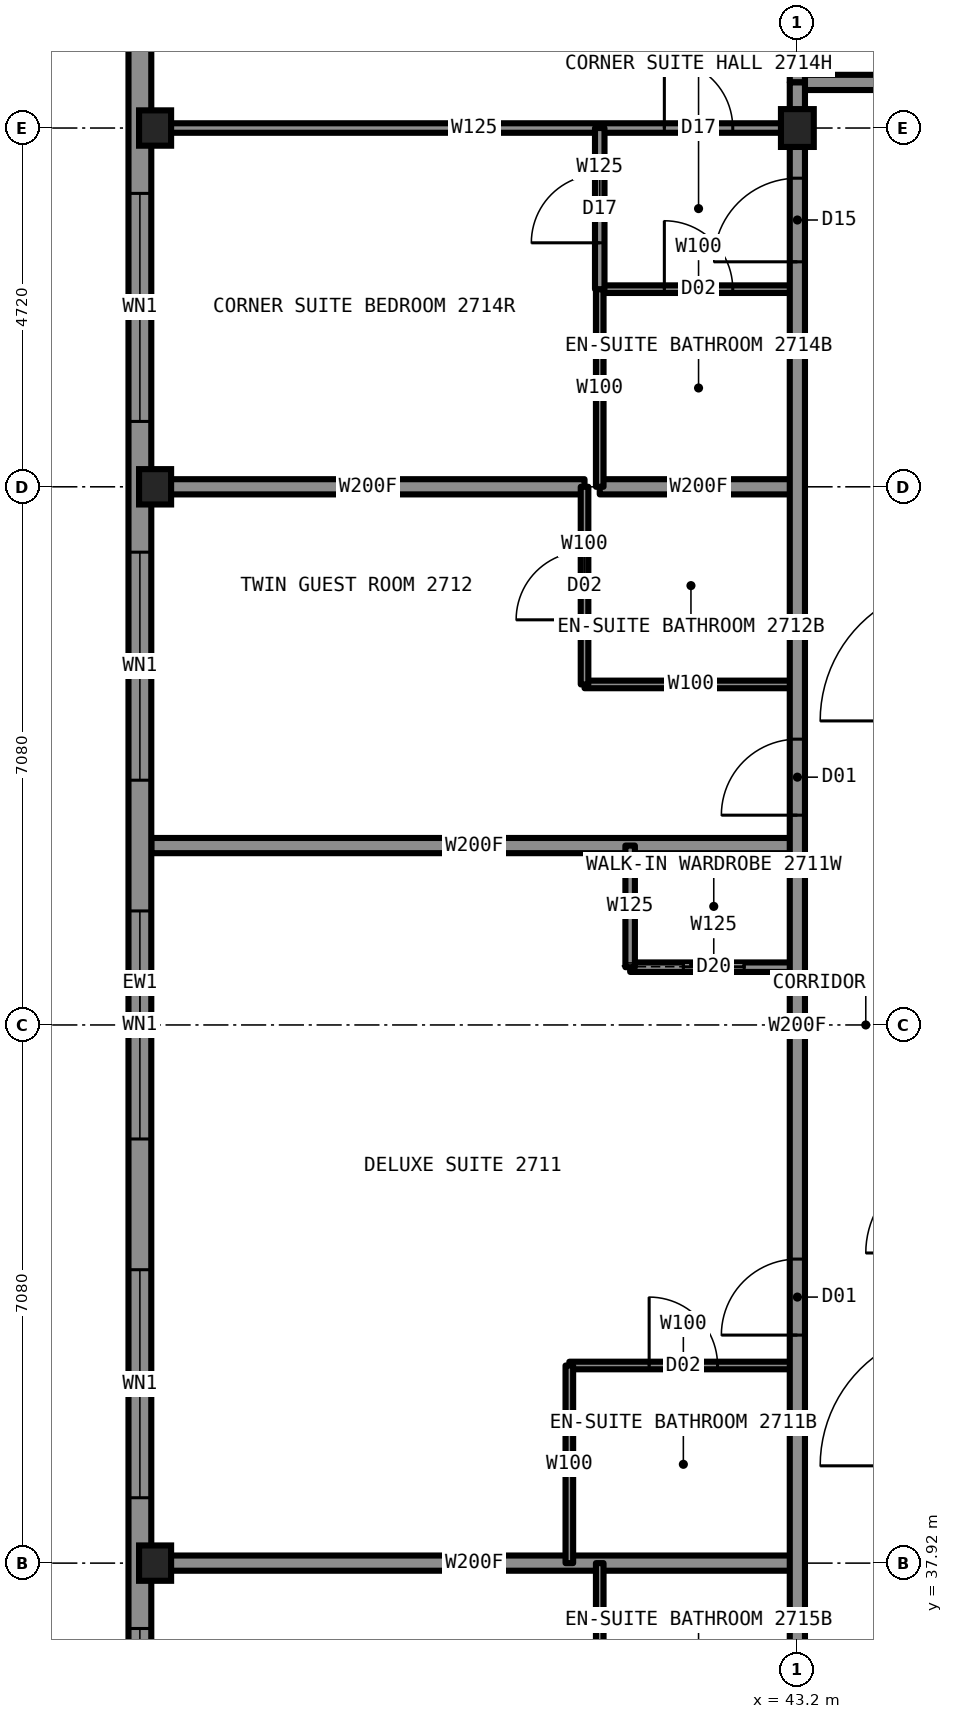
"""IFC4 building model, lengths in metres.
Left out: names, types, materials, properties, quantities, classifications, styles, units other than length and angle.
Written with IfcOpenShell. Run it as: python <this file> out.ifc"""

import sys

from ifc_helpers import new_model, si_unit, direction, frame, frame_2d, origin, origin_2d, place, context, subcontext, project, spatial, rectangle, i_section, extrude, element, fill, save


model = new_model("IFC4")
c1 = context("Model", 3, precision=1e-05, world=origin(), true_north=direction((0.0, 1.0)))
c2 = subcontext(c1, "Body", "Model", "MODEL_VIEW")
j1 = project(units=[si_unit("LENGTHUNIT", "METRE"), si_unit("PLANEANGLEUNIT", "RADIAN")], contexts=[c1])
p1 = place(None, origin())
s1 = spatial("IfcSite", under=j1, at=p1, CompositionType="ELEMENT")
p2 = place(p1, origin())
s2 = spatial("IfcBuilding", under=s1, at=p2, CompositionType="ELEMENT")
p3 = place(p2, frame((0.0, 0.0, 103.9)))
s3 = spatial("IfcBuildingStorey", under=s2, at=p3, CompositionType="ELEMENT", Elevation=103.9)
for number, where, z_axis, x_axis in (
    (1, (34.75, 37.92, 0.0), (0.0, 0.0, 1.0), (1.0, 0.0, 0.0)),
    (2, (34.75, 52.08, 0.0), (0.0, 0.0, 1.0), (1.0, 0.0, 0.0)),
    (3, (34.75, 56.8, 0.0), (0.0, 0.0, 1.0), (1.0, 0.0, 0.0)),
):
    element("IfcColumn", number, at=place(p3, frame(where, z_axis=z_axis, x_axis=x_axis)), inside=s3, PredefinedType="COLUMN", context=c2, shape_type="SweptSolid", body=[
        extrude(i_section(OverallWidth=0.422, OverallDepth=0.465, WebThickness=0.045, FlangeThickness=0.073, at=origin_2d()), origin(), (0.0, 0.0, 1.0), 3.5),
    ])
p4 = place(p3, frame((43.2, 56.8, 0.0), z_axis=(0.0, 0.0, 1.0), x_axis=(1.0, 0.0, 0.0)))
e4 = element("IfcColumn", 4, at=p4, inside=s3, PredefinedType="COLUMN", context=c2, shape_type="SweptSolid", body=[
    extrude(i_section(OverallWidth=0.432, OverallDepth=0.498, WebThickness=0.056, FlangeThickness=0.089, at=origin_2d()), origin(), (0.0, 0.0, 1.0), 3.5),
])
p5 = place(p3, frame((40.2, 40.52, 0.0), z_axis=(0.0, 0.0, 1.0), x_axis=(1.0, 0.0, 0.0)))
e5 = element("IfcWall", 5, at=p5, inside=s3, PredefinedType="PARTITIONING", context=c2, shape_type="SweptSolid", body=[
    extrude(rectangle(XDim=3.0, YDim=0.1, at=frame_2d((1.5, 0.0))), origin(), (0.0, 0.0, 1.0), 3.33),
])
p6 = place(p5, frame((1.05, 0.0, 0.0)))
e6 = element("IfcOpeningElement", 6, at=p6, cuts=e5, PredefinedType="OPENING", context=c2, shape_type="SweptSolid", body=[
    extrude(rectangle(XDim=0.9, YDim=2.1, at=frame_2d((0.45, 1.05))), frame((0.0, 0.06, 0.0), z_axis=(0.0, -1.0, 0.0), x_axis=(1.0, 0.0, 0.0)), (0.0, 0.0, 1.0), 0.12),
])
p7 = place(p3, frame((34.7, 37.92, 0.0), z_axis=(0.0, 0.0, 1.0), x_axis=(1.0, 0.0, 0.0)))
e7 = element("IfcWall", 7, at=p7, inside=s3, PredefinedType="PARTITIONING", context=c2, shape_type="SweptSolid", body=[
    extrude(rectangle(XDim=8.5, YDim=0.2, at=frame_2d((4.25, 0.0))), origin(), (0.0, 0.0, 1.0), 2.573),
])
p8 = place(p3, frame((41.0, 45.76, 0.0), z_axis=(0.0, 0.0, 1.0), x_axis=(1.0, 0.0, 0.0)))
e8 = element("IfcWall", 8, at=p8, inside=s3, PredefinedType="PARTITIONING", context=c2, shape_type="SweptSolid", body=[
    extrude(rectangle(XDim=2.2, YDim=0.125, at=frame_2d((1.1, 0.0))), origin(), (0.0, 0.0, 1.0), 3.33),
])
p9 = place(p8, frame((0.7, 0.0, 0.0)))
e9 = element("IfcOpeningElement", 9, at=p9, cuts=e8, PredefinedType="OPENING", context=c2, shape_type="SweptSolid", body=[
    extrude(rectangle(XDim=0.8, YDim=2.1, at=frame_2d((0.4, 1.05))), frame((0.0, 0.073, 0.0), z_axis=(0.0, -1.0, 0.0), x_axis=(1.0, 0.0, 0.0)), (0.0, 0.0, 1.0), 0.145),
])
p10 = place(p3, frame((34.7, 56.8, 0.0), z_axis=(0.0, 0.0, 1.0), x_axis=(1.0, 0.0, 0.0)))
e10 = element("IfcWall", 10, at=p10, inside=s3, PredefinedType="PARTITIONING", context=c2, shape_type="SweptSolid", body=[
    extrude(rectangle(XDim=8.5, YDim=0.125, at=frame_2d((4.25, 0.0))), origin(), (0.0, 0.0, 1.0), 2.573),
])
p11 = place(p10, frame((6.75, 0.0, 0.0)))
e11 = element("IfcOpeningElement", 11, at=p11, cuts=e10, PredefinedType="OPENING", context=c2, shape_type="SweptSolid", body=[
    extrude(rectangle(XDim=0.9, YDim=2.2, at=frame_2d((0.45, 1.1))), frame((0.0, 0.073, 0.0), z_axis=(0.0, -1.0, 0.0), x_axis=(1.0, 0.0, 0.0)), (0.0, 0.0, 1.0), 0.145),
])
p12 = place(p3, frame((43.2, 57.4, 0.0), z_axis=(0.0, 0.0, 1.0), x_axis=(1.0, 0.0, 0.0)))
e12 = element("IfcWall", 12, at=p12, inside=s3, PredefinedType="PARTITIONING", context=c2, shape_type="SweptSolid", body=[
    extrude(rectangle(XDim=23.6, YDim=0.2, at=frame_2d((11.8, 0.0))), origin(), (0.0, 0.0, 1.0), 3.33),
])
p13 = place(p12, frame((2.55, 0.0, 0.0)))
e13 = element("IfcOpeningElement", 13, at=p13, cuts=e12, PredefinedType="OPENING", context=c2, shape_type="SweptSolid", body=[
    extrude(rectangle(XDim=1.0, YDim=2.2, at=frame_2d((0.5, 1.1))), frame((0.0, 0.11, 0.0), z_axis=(0.0, -1.0, 0.0), x_axis=(1.0, 0.0, 0.0)), (0.0, 0.0, 1.0), 0.22),
])
p14 = place(p12, frame((7.72, 0.0, 0.0)))
e14 = element("IfcOpeningElement", 14, at=p14, cuts=e12, PredefinedType="OPENING", context=c2, shape_type="SweptSolid", body=[
    extrude(rectangle(XDim=1.0, YDim=2.2, at=frame_2d((0.5, 1.1))), frame((0.0, 0.11, 0.0), z_axis=(0.0, -1.0, 0.0), x_axis=(1.0, 0.0, 0.0)), (0.0, 0.0, 1.0), 0.22),
])
p15 = place(p12, frame((14.56, 0.0, 0.0)))
e15 = element("IfcOpeningElement", 15, at=p15, cuts=e12, PredefinedType="OPENING", context=c2, shape_type="SweptSolid", body=[
    extrude(rectangle(XDim=1.0, YDim=2.2, at=frame_2d((0.5, 1.1))), frame((0.0, 0.11, 0.0), z_axis=(0.0, -1.0, 0.0), x_axis=(1.0, 0.0, 0.0)), (0.0, 0.0, 1.0), 0.22),
])
p16 = place(p12, frame((20.34, 0.0, 0.0)))
e16 = element("IfcOpeningElement", 16, at=p16, cuts=e12, PredefinedType="OPENING", context=c2, shape_type="SweptSolid", body=[
    extrude(rectangle(XDim=1.0, YDim=2.2, at=frame_2d((0.5, 1.1))), frame((0.0, 0.11, 0.0), z_axis=(0.0, -1.0, 0.0), x_axis=(1.0, 0.0, 0.0)), (0.0, 0.0, 1.0), 0.22),
])
p17 = place(p3, frame((34.7, 47.36, 0.0), z_axis=(0.0, 0.0, 1.0), x_axis=(1.0, 0.0, 0.0)))
e17 = element("IfcWall", 17, at=p17, inside=s3, PredefinedType="PARTITIONING", context=c2, shape_type="SweptSolid", body=[
    extrude(rectangle(XDim=8.5, YDim=0.2, at=frame_2d((4.25, 0.0))), origin(), (0.0, 0.0, 1.0), 2.731),
])
p18 = place(p3, frame((40.4, 49.48, 0.0), z_axis=(0.0, 0.0, 1.0), x_axis=(1.0, 0.0, 0.0)))
e18 = element("IfcWall", 18, at=p18, inside=s3, PredefinedType="PARTITIONING", context=c2, shape_type="SweptSolid", body=[
    extrude(rectangle(XDim=2.8, YDim=0.1, at=frame_2d((1.4, 0.0))), origin(), (0.0, 0.0, 1.0), 3.33),
])
p19 = place(p3, frame((34.7, 52.08, 0.0), z_axis=(0.0, 0.0, 1.0), x_axis=(1.0, 0.0, 0.0)))
e19 = element("IfcWall", 19, at=p19, inside=s3, PredefinedType="PARTITIONING", context=c2, shape_type="SweptSolid", body=[
    extrude(rectangle(XDim=5.7, YDim=0.2, at=frame_2d((2.85, 0.0))), origin(), (0.0, 0.0, 1.0), 2.573),
])
p20 = place(p3, frame((40.6, 52.08, 0.0), z_axis=(0.0, 0.0, 1.0), x_axis=(1.0, 0.0, 0.0)))
e20 = element("IfcWall", 20, at=p20, inside=s3, PredefinedType="PARTITIONING", context=c2, shape_type="SweptSolid", body=[
    extrude(rectangle(XDim=2.6, YDim=0.2, at=frame_2d((1.3, 0.0))), origin(), (0.0, 0.0, 1.0), 2.573),
])
p21 = place(p3, frame((40.6, 54.68, 0.0), z_axis=(0.0, 0.0, 1.0), x_axis=(1.0, 0.0, 0.0)))
e21 = element("IfcWall", 21, at=p21, inside=s3, PredefinedType="PARTITIONING", context=c2, shape_type="SweptSolid", body=[
    extrude(rectangle(XDim=2.6, YDim=0.1, at=frame_2d((1.3, 0.0))), origin(), (0.0, 0.0, 1.0), 3.33),
])
p22 = place(p21, frame((0.85, 0.0, 0.0)))
e22 = element("IfcOpeningElement", 22, at=p22, cuts=e21, PredefinedType="OPENING", context=c2, shape_type="SweptSolid", body=[
    extrude(rectangle(XDim=0.9, YDim=2.1, at=frame_2d((0.45, 1.05))), frame((0.0, 0.06, 0.0), z_axis=(0.0, -1.0, 0.0), x_axis=(1.0, 0.0, 0.0)), (0.0, 0.0, 1.0), 0.12),
])
p23 = place(p3, frame((43.2, 33.2, 0.0), z_axis=(0.0, 0.0, 1.0), x_axis=(0.0, 1.0, 0.0)))
e23 = element("IfcWall", 23, at=p23, inside=s3, PredefinedType="PARTITIONING", context=c2, shape_type="SweptSolid", body=[
    extrude(rectangle(XDim=23.58, YDim=0.2, at=frame_2d((11.79, 0.0))), origin(), (0.0, 0.0, 1.0), 3.33),
])
p24 = place(p23, frame((7.72, 0.0, 0.0)))
e24 = element("IfcOpeningElement", 24, at=p24, cuts=e23, PredefinedType="OPENING", context=c2, shape_type="SweptSolid", body=[
    extrude(rectangle(XDim=1.0, YDim=2.2, at=frame_2d((0.5, 1.1))), frame((0.0, 0.11, 0.0), z_axis=(0.0, -1.0, 0.0), x_axis=(1.0, 0.0, 0.0)), (0.0, 0.0, 1.0), 0.22),
])
p25 = place(p23, frame((14.56, 0.0, 0.0)))
e25 = element("IfcOpeningElement", 25, at=p25, cuts=e23, PredefinedType="OPENING", context=c2, shape_type="SweptSolid", body=[
    extrude(rectangle(XDim=1.0, YDim=2.2, at=frame_2d((0.5, 1.1))), frame((0.0, 0.11, 0.0), z_axis=(0.0, -1.0, 0.0), x_axis=(1.0, 0.0, 0.0)), (0.0, 0.0, 1.0), 0.22),
])
p26 = place(p23, frame((21.84, 0.0, 0.0)))
e26 = element("IfcOpeningElement", 26, at=p26, cuts=e23, PredefinedType="OPENING", context=c2, shape_type="SweptSolid", body=[
    extrude(rectangle(XDim=1.1, YDim=2.2, at=frame_2d((0.55, 1.1))), frame((0.0, 0.11, 0.0), z_axis=(0.0, -1.0, 0.0), x_axis=(1.0, 0.0, 0.0)), (0.0, 0.0, 1.0), 0.22),
])
p27 = place(p23, frame((0.66, 0.0, 0.0)))
e27 = element("IfcOpeningElement", 27, at=p27, cuts=e23, PredefinedType="OPENING", context=c2, shape_type="SweptSolid", body=[
    extrude(rectangle(XDim=1.1, YDim=2.2, at=frame_2d((0.55, 1.1))), frame((0.0, 0.11, 0.0), z_axis=(0.0, -1.0, 0.0), x_axis=(1.0, 0.0, 0.0)), (0.0, 0.0, 1.0), 0.22),
])
p28 = place(p3, frame((43.2, 57.4, 0.0), z_axis=(0.0, 0.0, 1.0), x_axis=(0.0, 1.0, 0.0)))
e28 = element("IfcWall", 28, at=p28, inside=s3, PredefinedType="PARTITIONING", context=c2, shape_type="SweptSolid", body=[
    extrude(rectangle(XDim=7.9, YDim=0.2, at=frame_2d((3.95, 0.0))), origin(), (0.0, 0.0, 1.0), 2.573),
])
p29 = place(p3, frame((41.0, 45.76, 0.0), z_axis=(0.0, 0.0, 1.0), x_axis=(0.0, 1.0, 0.0)))
e29 = element("IfcWall", 29, at=p29, inside=s3, PredefinedType="PARTITIONING", context=c2, shape_type="SweptSolid", body=[
    extrude(rectangle(XDim=1.6, YDim=0.125, at=frame_2d((0.8, 0.0))), origin(), (0.0, 0.0, 1.0), 3.33),
])
for number, where, z_axis, x_axis in (
    (30, (40.6, 35.32, 0.0), (0.0, 0.0, 1.0), (0.0, 1.0, 0.0)),
    (31, (40.6, 52.08, 0.0), (0.0, 0.0, 1.0), (0.0, 1.0, 0.0)),
):
    element("IfcWall", number, at=place(p3, frame(where, z_axis=z_axis, x_axis=x_axis)), inside=s3, PredefinedType="PARTITIONING", context=c2, shape_type="SweptSolid", body=[
        extrude(rectangle(XDim=2.6, YDim=0.1, at=frame_2d((1.3, 0.0))), origin(), (0.0, 0.0, 1.0), 3.33),
    ])
p30 = place(p3, frame((40.6, 54.68, 0.0), z_axis=(0.0, 0.0, 1.0), x_axis=(0.0, 1.0, 0.0)))
e32 = element("IfcWall", 32, at=p30, inside=s3, PredefinedType="PARTITIONING", context=c2, shape_type="SweptSolid", body=[
    extrude(rectangle(XDim=2.12, YDim=0.125, at=frame_2d((1.06, 0.0))), origin(), (0.0, 0.0, 1.0), 3.33),
])
p31 = place(p30, frame((0.61, 0.0, 0.0)))
e33 = element("IfcOpeningElement", 33, at=p31, cuts=e32, PredefinedType="OPENING", context=c2, shape_type="SweptSolid", body=[
    extrude(rectangle(XDim=0.9, YDim=2.2, at=frame_2d((0.45, 1.1))), frame((0.0, 0.073, 0.0), z_axis=(0.0, -1.0, 0.0), x_axis=(1.0, 0.0, 0.0)), (0.0, 0.0, 1.0), 0.145),
])
p32 = place(p3, frame((40.4, 49.48, 0.0), z_axis=(0.0, 0.0, 1.0), x_axis=(0.0, 1.0, 0.0)))
e34 = element("IfcWall", 34, at=p32, inside=s3, PredefinedType="PARTITIONING", context=c2, shape_type="SweptSolid", body=[
    extrude(rectangle(XDim=2.6, YDim=0.1, at=frame_2d((1.3, 0.0))), origin(), (0.0, 0.0, 1.0), 3.33),
])
p33 = place(p32, frame((0.85, 0.0, 0.0)))
e35 = element("IfcOpeningElement", 35, at=p33, cuts=e34, PredefinedType="OPENING", context=c2, shape_type="SweptSolid", body=[
    extrude(rectangle(XDim=0.9, YDim=2.1, at=frame_2d((0.45, 1.05))), frame((0.0, 0.06, 0.0), z_axis=(0.0, -1.0, 0.0), x_axis=(1.0, 0.0, 0.0)), (0.0, 0.0, 1.0), 0.12),
])
p34 = place(p3, frame((40.2, 37.92, 0.0), z_axis=(0.0, 0.0, 1.0), x_axis=(0.0, 1.0, 0.0)))
e36 = element("IfcWall", 36, at=p34, inside=s3, PredefinedType="PARTITIONING", context=c2, shape_type="SweptSolid", body=[
    extrude(rectangle(XDim=2.6, YDim=0.1, at=frame_2d((1.3, 0.0))), origin(), (0.0, 0.0, 1.0), 3.33),
])
p35 = place(p3, frame((34.55, 60.1, 0.0), z_axis=(0.0, 0.0, 1.0), x_axis=(0.0, -1.0, 0.0)))
e37 = element("IfcWall", 37, at=p35, inside=s3, PredefinedType="SOLIDWALL", context=c2, shape_type="SweptSolid", body=[
    extrude(rectangle(XDim=30.2, YDim=0.3, at=frame_2d((15.1, 0.0))), origin(), (0.0, 0.0, 1.0), 2.83),
])
p36 = place(p35, frame((4.16, 0.0, 0.5)))
e38 = element("IfcOpeningElement", 38, at=p36, cuts=e37, PredefinedType="OPENING", context=c2, shape_type="SweptSolid", body=[
    extrude(rectangle(XDim=3.0, YDim=2.0, at=frame_2d((1.5, 1.0))), frame((0.0, 0.16, 0.0), z_axis=(0.0, -1.0, 0.0), x_axis=(1.0, 0.0, 0.0)), (0.0, 0.0, 1.0), 0.32),
])
p37 = place(p35, frame((8.88, 0.0, 0.5)))
e39 = element("IfcOpeningElement", 39, at=p37, cuts=e37, PredefinedType="OPENING", context=c2, shape_type="SweptSolid", body=[
    extrude(rectangle(XDim=3.0, YDim=2.0, at=frame_2d((1.5, 1.0))), frame((0.0, 0.16, 0.0), z_axis=(0.0, -1.0, 0.0), x_axis=(1.0, 0.0, 0.0)), (0.0, 0.0, 1.0), 0.32),
])
p38 = place(p35, frame((13.6, 0.0, 0.5)))
e40 = element("IfcOpeningElement", 40, at=p38, cuts=e37, PredefinedType="OPENING", context=c2, shape_type="SweptSolid", body=[
    extrude(rectangle(XDim=3.0, YDim=2.0, at=frame_2d((1.5, 1.0))), frame((0.0, 0.16, 0.0), z_axis=(0.0, -1.0, 0.0), x_axis=(1.0, 0.0, 0.0)), (0.0, 0.0, 1.0), 0.32),
])
p39 = place(p35, frame((18.32, 0.0, 0.5)))
e41 = element("IfcOpeningElement", 41, at=p39, cuts=e37, PredefinedType="OPENING", context=c2, shape_type="SweptSolid", body=[
    extrude(rectangle(XDim=3.0, YDim=2.0, at=frame_2d((1.5, 1.0))), frame((0.0, 0.16, 0.0), z_axis=(0.0, -1.0, 0.0), x_axis=(1.0, 0.0, 0.0)), (0.0, 0.0, 1.0), 0.32),
])
p40 = place(p35, frame((23.04, 0.0, 0.5)))
e42 = element("IfcOpeningElement", 42, at=p40, cuts=e37, PredefinedType="OPENING", context=c2, shape_type="SweptSolid", body=[
    extrude(rectangle(XDim=3.0, YDim=2.0, at=frame_2d((1.5, 1.0))), frame((0.0, 0.16, 0.0), z_axis=(0.0, -1.0, 0.0), x_axis=(1.0, 0.0, 0.0)), (0.0, 0.0, 1.0), 0.32),
])
p41 = place(p3, frame((43.2, 56.78, 0.0), z_axis=(0.0, 0.0, 1.0), x_axis=(0.0, 1.0, 0.0)))
e43 = element("IfcWall", 43, at=p41, inside=s3, PredefinedType="PARTITIONING", context=c2, shape_type="SweptSolid", body=[
    extrude(rectangle(XDim=0.62, YDim=0.2, at=frame_2d((0.31, 0.0))), origin(), (0.0, 0.0, 1.0), 2.573),
])
p42 = place(p24, origin())
e44 = element("IfcDoor", 44, at=p42, inside=s3, OperationType="SINGLE_SWING_LEFT", PredefinedType="DOOR", context=c2, shape_type="SweptSolid", body=[
    extrude(rectangle(XDim=1.0, YDim=2.2, at=frame_2d((0.5, 1.1))), frame((0.0, 0.025, 0.0), z_axis=(0.0, -1.0, 0.0), x_axis=(1.0, 0.0, 0.0)), (0.0, 0.0, 1.0), 0.05),
])
fill(e24, e44)
p43 = place(p6, origin())
e45 = element("IfcDoor", 45, at=p43, inside=s3, OperationType="SINGLE_SWING_RIGHT", PredefinedType="DOOR", context=c2, shape_type="SweptSolid", body=[
    extrude(rectangle(XDim=0.9, YDim=2.1, at=frame_2d((0.45, 1.05))), frame((0.0, 0.025, 0.0), z_axis=(0.0, -1.0, 0.0), x_axis=(1.0, 0.0, 0.0)), (0.0, 0.0, 1.0), 0.05),
])
fill(e6, e45)
p44 = place(p9, origin())
e46 = element("IfcDoor", 46, at=p44, inside=s3, OperationType="SLIDING_TO_LEFT", PredefinedType="DOOR", context=c2, shape_type="SweptSolid", body=[
    extrude(rectangle(XDim=0.8, YDim=2.1, at=frame_2d((0.4, 1.05))), frame((0.0, 0.025, 0.0), z_axis=(0.0, -1.0, 0.0), x_axis=(1.0, 0.0, 0.0)), (0.0, 0.0, 1.0), 0.05),
])
fill(e9, e46)
p45 = place(p25, origin())
e47 = element("IfcDoor", 47, at=p45, inside=s3, OperationType="SINGLE_SWING_LEFT", PredefinedType="DOOR", context=c2, shape_type="SweptSolid", body=[
    extrude(rectangle(XDim=1.0, YDim=2.2, at=frame_2d((0.5, 1.1))), frame((0.0, 0.025, 0.0), z_axis=(0.0, -1.0, 0.0), x_axis=(1.0, 0.0, 0.0)), (0.0, 0.0, 1.0), 0.05),
])
fill(e25, e47)
p46 = place(p33, origin())
e48 = element("IfcDoor", 48, at=p46, inside=s3, OperationType="SINGLE_SWING_RIGHT", PredefinedType="DOOR", context=c2, shape_type="SweptSolid", body=[
    extrude(rectangle(XDim=0.9, YDim=2.1, at=frame_2d((0.45, 1.05))), frame((0.0, 0.025, 0.0), z_axis=(0.0, -1.0, 0.0), x_axis=(1.0, 0.0, 0.0)), (0.0, 0.0, 1.0), 0.05),
])
fill(e35, e48)
p47 = place(p11, origin())
e49 = element("IfcDoor", 49, at=p47, inside=s3, OperationType="SINGLE_SWING_LEFT", PredefinedType="DOOR", context=c2, shape_type="SweptSolid", body=[
    extrude(rectangle(XDim=0.9, YDim=2.2, at=frame_2d((0.45, 1.1))), frame((0.0, 0.025, 0.0), z_axis=(0.0, -1.0, 0.0), x_axis=(1.0, 0.0, 0.0)), (0.0, 0.0, 1.0), 0.05),
])
fill(e11, e49)
p48 = place(p22, origin())
e50 = element("IfcDoor", 50, at=p48, inside=s3, OperationType="SINGLE_SWING_RIGHT", PredefinedType="DOOR", context=c2, shape_type="SweptSolid", body=[
    extrude(rectangle(XDim=0.9, YDim=2.1, at=frame_2d((0.45, 1.05))), frame((0.0, 0.025, 0.0), z_axis=(0.0, -1.0, 0.0), x_axis=(1.0, 0.0, 0.0)), (0.0, 0.0, 1.0), 0.05),
])
fill(e22, e50)
p49 = place(p26, origin())
e51 = element("IfcDoor", 51, at=p49, inside=s3, OperationType="SINGLE_SWING_LEFT", PredefinedType="DOOR", context=c2, shape_type="SweptSolid", body=[
    extrude(rectangle(XDim=1.1, YDim=2.2, at=frame_2d((0.55, 1.1))), frame((0.0, 0.025, 0.0), z_axis=(0.0, -1.0, 0.0), x_axis=(1.0, 0.0, 0.0)), (0.0, 0.0, 1.0), 0.05),
])
fill(e26, e51)
p50 = place(p31, origin())
e52 = element("IfcDoor", 52, at=p50, inside=s3, OperationType="SINGLE_SWING_LEFT", PredefinedType="DOOR", context=c2, shape_type="SweptSolid", body=[
    extrude(rectangle(XDim=0.9, YDim=2.2, at=frame_2d((0.45, 1.1))), frame((0.0, 0.025, 0.0), z_axis=(0.0, -1.0, 0.0), x_axis=(1.0, 0.0, 0.0)), (0.0, 0.0, 1.0), 0.05),
])
fill(e33, e52)
p51 = place(p36, origin())
e53 = element("IfcWindow", 53, at=p51, inside=s3, PartitioningType="SINGLE_PANEL", PredefinedType="WINDOW", context=c2, shape_type="SweptSolid", body=[
    extrude(rectangle(XDim=3.0, YDim=2.0, at=frame_2d((1.5, 1.0))), frame((0.0, 0.03, 0.0), z_axis=(0.0, -1.0, 0.0), x_axis=(1.0, 0.0, 0.0)), (0.0, 0.0, 1.0), 0.06),
])
fill(e38, e53)
p52 = place(p37, origin())
e54 = element("IfcWindow", 54, at=p52, inside=s3, PartitioningType="SINGLE_PANEL", PredefinedType="WINDOW", context=c2, shape_type="SweptSolid", body=[
    extrude(rectangle(XDim=3.0, YDim=2.0, at=frame_2d((1.5, 1.0))), frame((0.0, 0.03, 0.0), z_axis=(0.0, -1.0, 0.0), x_axis=(1.0, 0.0, 0.0)), (0.0, 0.0, 1.0), 0.06),
])
fill(e39, e54)
p53 = place(p38, origin())
e55 = element("IfcWindow", 55, at=p53, inside=s3, PartitioningType="SINGLE_PANEL", PredefinedType="WINDOW", context=c2, shape_type="SweptSolid", body=[
    extrude(rectangle(XDim=3.0, YDim=2.0, at=frame_2d((1.5, 1.0))), frame((0.0, 0.03, 0.0), z_axis=(0.0, -1.0, 0.0), x_axis=(1.0, 0.0, 0.0)), (0.0, 0.0, 1.0), 0.06),
])
fill(e40, e55)
p54 = place(p39, origin())
e56 = element("IfcWindow", 56, at=p54, inside=s3, PartitioningType="SINGLE_PANEL", PredefinedType="WINDOW", context=c2, shape_type="SweptSolid", body=[
    extrude(rectangle(XDim=3.0, YDim=2.0, at=frame_2d((1.5, 1.0))), frame((0.0, 0.03, 0.0), z_axis=(0.0, -1.0, 0.0), x_axis=(1.0, 0.0, 0.0)), (0.0, 0.0, 1.0), 0.06),
])
fill(e41, e56)
p55 = place(p40, origin())
e57 = element("IfcWindow", 57, at=p55, inside=s3, PartitioningType="SINGLE_PANEL", PredefinedType="WINDOW", context=c2, shape_type="SweptSolid", body=[
    extrude(rectangle(XDim=3.0, YDim=2.0, at=frame_2d((1.5, 1.0))), frame((0.0, 0.03, 0.0), z_axis=(0.0, -1.0, 0.0), x_axis=(1.0, 0.0, 0.0)), (0.0, 0.0, 1.0), 0.06),
])
fill(e42, e57)
save(model, sys.argv[1])
